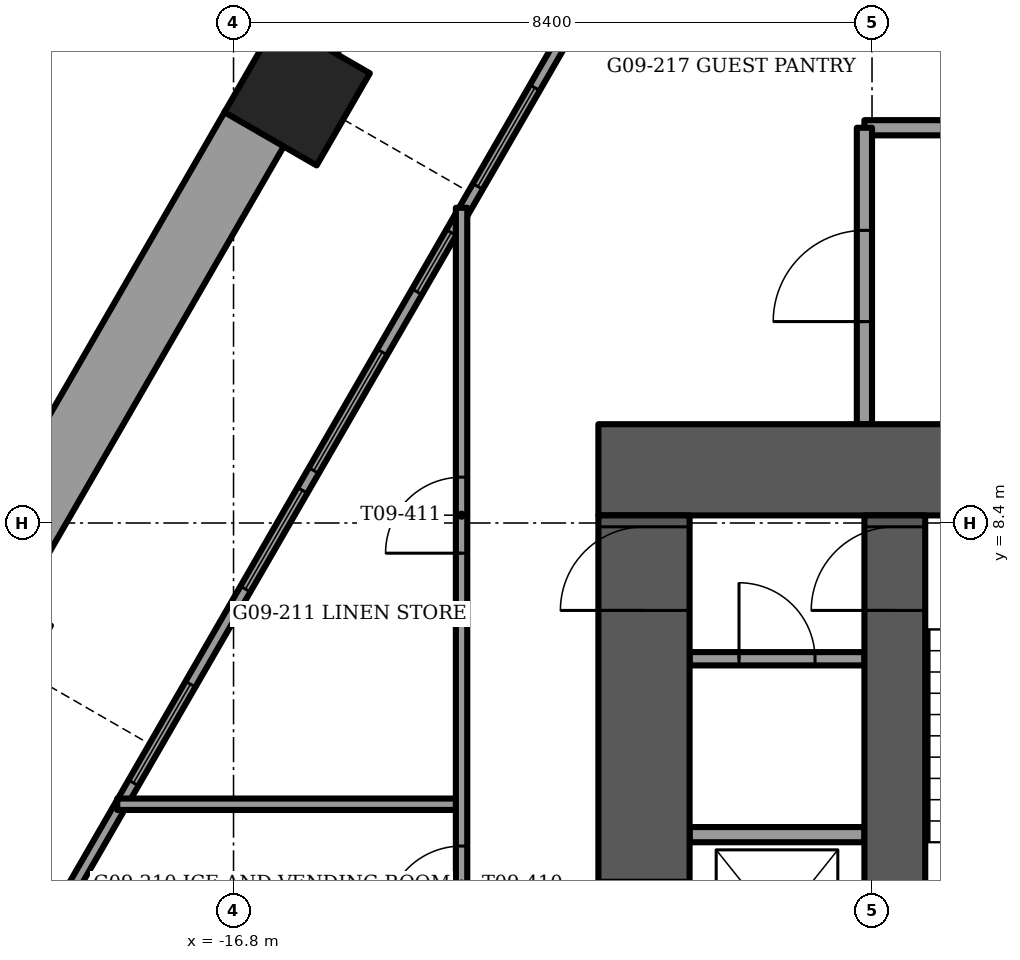
"""IFC4 building model, lengths in metres.
Left out: names, types, materials, properties, quantities, classifications, styles, units other than length and angle.
Written with IfcOpenShell. Run it as: python <this file> out.ifc"""

import sys

from ifc_helpers import new_model, si_unit, direction, frame, frame_2d, origin, origin_2d, place, context, subcontext, project, spatial, rectangle, extrude, element, fill, save


model = new_model("IFC4")
c1 = context("Model", 3, precision=1e-05, world=origin(), true_north=direction((0.0, 1.0)))
c2 = subcontext(c1, "Body", "Model", "MODEL_VIEW")
j1 = project(units=[si_unit("LENGTHUNIT", "METRE"), si_unit("PLANEANGLEUNIT", "RADIAN")], contexts=[c1])
p1 = place(None, origin())
s1 = spatial("IfcSite", under=j1, at=p1, CompositionType="ELEMENT")
p2 = place(p1, origin())
s2 = spatial("IfcBuilding", under=s1, at=p2, CompositionType="ELEMENT")
p3 = place(p2, frame((0.0, 0.0, 39.25)))
s3 = spatial("IfcBuildingStorey", under=s2, at=p3, CompositionType="ELEMENT", Elevation=39.25)
p4 = place(p3, frame((-15.963, 14.061, -1.2), z_axis=(0.0, 0.0, 1.0), x_axis=(0.5, 0.866025403784, 0.0)))
e1 = element("IfcColumn", 1, at=p4, inside=s3, PredefinedType="COLUMN", context=c2, shape_type="SweptSolid", body=[
    extrude(rectangle(XDim=1.4, YDim=1.4, at=origin_2d()), origin(), (0.0, 0.0, 1.0), 3.75),
])
p5 = place(p3, frame((-12.0, 9.1, -0.3), z_axis=(0.0, 0.0, 1.0), x_axis=(1.0, 0.0, 0.0)))
e2 = element("IfcWall", 2, at=p5, inside=s3, PredefinedType="SHEAR", context=c2, shape_type="SweptSolid", body=[
    extrude(rectangle(XDim=24.0, YDim=1.2, at=frame_2d((12.0, 0.0))), origin(), (0.0, 0.0, 1.0), 3.75),
])
p6 = place(p5, frame((11.2, 0.0, 0.0)))
e3 = element("IfcOpeningElement", 3, at=p6, cuts=e2, PredefinedType="OPENING", context=c2, shape_type="SweptSolid", body=[
    extrude(rectangle(XDim=1.6, YDim=2.1, at=frame_2d((0.8, 1.05))), frame((0.0, 0.6, 0.0), z_axis=(0.0, -1.0, 0.0), x_axis=(1.0, 0.0, 0.0)), (0.0, 0.0, 1.0), 1.2),
])
p7 = place(p5, frame((5.25, 0.0, 0.0)))
e4 = element("IfcOpeningElement", 4, at=p7, cuts=e2, PredefinedType="OPENING", context=c2, shape_type="SweptSolid", body=[
    extrude(rectangle(XDim=1.1, YDim=2.1, at=frame_2d((0.55, 1.05))), frame((0.0, 0.6, 0.0), z_axis=(0.0, -1.0, 0.0), x_axis=(1.0, 0.0, 0.0)), (0.0, 0.0, 1.0), 1.2),
])
p8 = place(p5, frame((17.65, 0.0, 0.0)))
e5 = element("IfcOpeningElement", 5, at=p8, cuts=e2, PredefinedType="OPENING", context=c2, shape_type="SweptSolid", body=[
    extrude(rectangle(XDim=1.1, YDim=2.1, at=frame_2d((0.55, 1.05))), frame((0.0, 0.6, 0.0), z_axis=(0.0, -1.0, 0.0), x_axis=(1.0, 0.0, 0.0)), (0.0, 0.0, 1.0), 1.2),
])
p9 = place(p3, frame((-8.1, -0.5, -0.3), z_axis=(0.0, 0.0, 1.0), x_axis=(0.0, 1.0, 0.0)))
e6 = element("IfcWall", 6, at=p9, inside=s3, PredefinedType="SHEAR", context=c2, shape_type="SweptSolid", body=[
    extrude(rectangle(XDim=9.0, YDim=0.8, at=frame_2d((4.5, 0.0))), origin(), (0.0, 0.0, 1.0), 3.75),
])
p10 = place(p9, frame((7.75, 0.0, 0.0)))
e7 = element("IfcOpeningElement", 7, at=p10, cuts=e6, PredefinedType="OPENING", context=c2, shape_type="SweptSolid", body=[
    extrude(rectangle(XDim=1.1, YDim=2.1, at=frame_2d((0.55, 1.05))), frame((0.0, 0.4, 0.0), z_axis=(0.0, -1.0, 0.0), x_axis=(1.0, 0.0, 0.0)), (0.0, 0.0, 1.0), 0.8),
])
p11 = place(p3, frame((-11.4, -0.5, -0.3), z_axis=(0.0, 0.0, 1.0), x_axis=(0.0, 1.0, 0.0)))
e8 = element("IfcWall", 8, at=p11, inside=s3, PredefinedType="SHEAR", context=c2, shape_type="SweptSolid", body=[
    extrude(rectangle(XDim=9.0, YDim=1.2, at=frame_2d((4.5, 0.0))), origin(), (0.0, 0.0, 1.0), 3.75),
])
p12 = place(p11, frame((7.75, 0.0, 0.0)))
e9 = element("IfcOpeningElement", 9, at=p12, cuts=e8, PredefinedType="OPENING", context=c2, shape_type="SweptSolid", body=[
    extrude(rectangle(XDim=1.1, YDim=2.1, at=frame_2d((0.55, 1.05))), frame((0.0, 0.6, 0.0), z_axis=(0.0, -1.0, 0.0), x_axis=(1.0, 0.0, 0.0)), (0.0, 0.0, 1.0), 1.2),
])
p13 = place(p11, frame((0.55, 0.0, 0.0)))
e10 = element("IfcOpeningElement", 10, at=p13, cuts=e8, PredefinedType="OPENING", context=c2, shape_type="SweptSolid", body=[
    extrude(rectangle(XDim=1.2, YDim=2.1, at=frame_2d((0.6, 1.05))), frame((0.0, 0.6, 0.0), z_axis=(0.0, -1.0, 0.0), x_axis=(1.0, 0.0, 0.0)), (0.0, 0.0, 1.0), 1.2),
])
p14 = place(p11, frame((3.0, 0.0, 0.0)))
e11 = element("IfcOpeningElement", 11, at=p14, cuts=e8, PredefinedType="OPENING", context=c2, shape_type="SweptSolid", body=[
    extrude(rectangle(XDim=1.2, YDim=2.1, at=frame_2d((0.6, 1.05))), frame((0.0, 0.6, 0.0), z_axis=(0.0, -1.0, 0.0), x_axis=(1.0, 0.0, 0.0)), (0.0, 0.0, 1.0), 1.2),
])
p15 = place(p3, frame((-12.422, 20.694, 0.0), z_axis=(0.0, 0.0, 1.0), x_axis=(-0.499994135611, -0.866028789565, 0.0)))
e12 = element("IfcWall", 12, at=p15, inside=s3, PredefinedType="PARAPET", context=c2, shape_type="SweptSolid", body=[
    extrude(rectangle(XDim=6.845, YDim=0.9, at=frame_2d((3.423, 0.0))), origin(), (0.0, 0.0, 1.0), 1.1),
])
p16 = place(p3, frame((-16.514, 13.605, 0.0), z_axis=(0.0, 0.0, 1.0), x_axis=(-0.499997206141, -0.866027016814, 0.0)))
e13 = element("IfcWall", 13, at=p16, inside=s3, PredefinedType="PARAPET", context=c2, shape_type="SweptSolid", body=[
    extrude(rectangle(XDim=7.051, YDim=0.9, at=frame_2d((3.525, 0.0))), origin(), (0.0, 0.0, 1.0), 1.1),
])
p17 = place(p3, frame((-9.276, 20.292, 0.0), z_axis=(0.0, 0.0, 1.0), x_axis=(-0.500006057782, -0.866021906294, 0.0)))
e14 = element("IfcWall", 14, at=p17, inside=s3, PredefinedType="SOLIDWALL", context=c2, shape_type="SweptSolid", body=[
    extrude(rectangle(XDim=23.1, YDim=0.15, at=frame_2d((11.55, 0.0))), origin(), (0.0, 0.0, 1.0), 3.45),
])
p18 = place(p17, frame((2.736, 0.0, 0.15)))
e15 = element("IfcOpeningElement", 15, at=p18, cuts=e14, PredefinedType="OPENING", context=c2, shape_type="SweptSolid", body=[
    extrude(rectangle(XDim=0.9, YDim=2.85, at=frame_2d((0.45, 1.425))), frame((0.0, 0.075, 0.0), z_axis=(0.0, -1.0, 0.0), x_axis=(1.0, 0.0, 0.0)), (0.0, 0.0, 1.0), 0.15),
])
p19 = place(p17, frame((3.825, 0.0, 0.15)))
e16 = element("IfcOpeningElement", 16, at=p19, cuts=e14, PredefinedType="OPENING", context=c2, shape_type="SweptSolid", body=[
    extrude(rectangle(XDim=1.5, YDim=2.85, at=frame_2d((0.75, 1.425))), frame((0.0, 0.075, 0.0), z_axis=(0.0, -1.0, 0.0), x_axis=(1.0, 0.0, 0.0)), (0.0, 0.0, 1.0), 0.15),
])
p20 = place(p17, frame((9.32, 0.0, 0.15)))
e17 = element("IfcOpeningElement", 17, at=p20, cuts=e14, PredefinedType="OPENING", context=c2, shape_type="SweptSolid", body=[
    extrude(rectangle(XDim=0.9, YDim=2.85, at=frame_2d((0.45, 1.425))), frame((0.0, 0.075, 0.0), z_axis=(0.0, -1.0, 0.0), x_axis=(1.0, 0.0, 0.0)), (0.0, 0.0, 1.0), 0.15),
])
p21 = place(p17, frame((7.12, 0.0, 0.15)))
e18 = element("IfcOpeningElement", 18, at=p21, cuts=e14, PredefinedType="OPENING", context=c2, shape_type="SweptSolid", body=[
    extrude(rectangle(XDim=1.5, YDim=2.85, at=frame_2d((0.75, 1.425))), frame((0.0, 0.075, 0.0), z_axis=(0.0, -1.0, 0.0), x_axis=(1.0, 0.0, 0.0)), (0.0, 0.0, 1.0), 0.15),
])
p22 = place(p17, frame((11.136, 0.0, 0.15)))
e19 = element("IfcOpeningElement", 19, at=p22, cuts=e14, PredefinedType="OPENING", context=c2, shape_type="SweptSolid", body=[
    extrude(rectangle(XDim=1.8, YDim=2.85, at=frame_2d((0.9, 1.425))), frame((0.0, 0.075, 0.0), z_axis=(0.0, -1.0, 0.0), x_axis=(1.0, 0.0, 0.0)), (0.0, 0.0, 1.0), 0.15),
])
p23 = place(p17, frame((13.236, 0.0, 0.15)))
e20 = element("IfcOpeningElement", 20, at=p23, cuts=e14, PredefinedType="OPENING", context=c2, shape_type="SweptSolid", body=[
    extrude(rectangle(XDim=1.5, YDim=2.85, at=frame_2d((0.75, 1.425))), frame((0.0, 0.075, 0.0), z_axis=(0.0, -1.0, 0.0), x_axis=(1.0, 0.0, 0.0)), (0.0, 0.0, 1.0), 0.15),
])
p24 = place(p17, frame((16.18, 0.0, 0.15)))
e21 = element("IfcOpeningElement", 21, at=p24, cuts=e14, PredefinedType="OPENING", context=c2, shape_type="SweptSolid", body=[
    extrude(rectangle(XDim=1.5, YDim=2.85, at=frame_2d((0.75, 1.425))), frame((0.0, 0.075, 0.0), z_axis=(0.0, -1.0, 0.0), x_axis=(1.0, 0.0, 0.0)), (0.0, 0.0, 1.0), 0.15),
])
p25 = place(p17, frame((0.44, 0.0, 0.15)))
e22 = element("IfcOpeningElement", 22, at=p25, cuts=e14, PredefinedType="OPENING", context=c2, shape_type="SweptSolid", body=[
    extrude(rectangle(XDim=0.9, YDim=2.73, at=frame_2d((0.45, 1.365))), frame((0.0, 0.075, 0.0), z_axis=(0.0, -1.0, 0.0), x_axis=(1.0, 0.0, 0.0)), (0.0, 0.0, 1.0), 0.15),
])
p26 = place(p17, frame((20.978, 0.0, 0.15)))
e23 = element("IfcOpeningElement", 23, at=p26, cuts=e14, PredefinedType="OPENING", context=c2, shape_type="SweptSolid", body=[
    extrude(rectangle(XDim=1.8, YDim=2.73, at=frame_2d((0.9, 1.365))), frame((0.0, 0.075, 0.0), z_axis=(0.0, -1.0, 0.0), x_axis=(1.0, 0.0, 0.0)), (0.0, 0.0, 1.0), 0.15),
])
p27 = place(p3, frame((-8.5, 13.6, 0.0), z_axis=(0.0, 0.0, 1.0), x_axis=(1.0, 0.0, 0.0)))
e24 = element("IfcWall", 24, at=p27, inside=s3, PredefinedType="PARTITIONING", context=c2, shape_type="SweptSolid", body=[
    extrude(rectangle(XDim=17.0, YDim=0.2, at=frame_2d((8.5, 0.0))), origin(), (0.0, 0.0, 1.0), 3.45),
])
p28 = place(p27, frame((8.0, 0.0, 0.0)))
e25 = element("IfcOpeningElement", 25, at=p28, cuts=e24, PredefinedType="OPENING", context=c2, shape_type="SweptSolid", body=[
    extrude(rectangle(XDim=1.0, YDim=2.1, at=frame_2d((0.5, 1.05))), frame((0.0, 0.1, 0.0), z_axis=(0.0, -1.0, 0.0), x_axis=(1.0, 0.0, 0.0)), (0.0, 0.0, 1.0), 0.2),
])
p29 = place(p3, frame((-8.5, 9.7, 0.0), z_axis=(0.0, 0.0, 1.0), x_axis=(0.0, 1.0, 0.0)))
e26 = element("IfcWall", 26, at=p29, inside=s3, PredefinedType="PARTITIONING", context=c2, shape_type="SweptSolid", body=[
    extrude(rectangle(XDim=3.9, YDim=0.2, at=frame_2d((1.95, 0.0))), origin(), (0.0, 0.0, 1.0), 3.45),
])
p30 = place(p29, frame((1.35, 0.0, 0.0)))
e27 = element("IfcOpeningElement", 27, at=p30, cuts=e26, PredefinedType="OPENING", context=c2, shape_type="SweptSolid", body=[
    extrude(rectangle(XDim=1.2, YDim=2.1, at=frame_2d((0.6, 1.05))), frame((0.0, 0.1, 0.0), z_axis=(0.0, -1.0, 0.0), x_axis=(1.0, 0.0, 0.0)), (0.0, 0.0, 1.0), 0.2),
])
p31 = place(p3, frame((-10.8, 4.3, 0.0), z_axis=(0.0, 0.0, 1.0), x_axis=(1.0, 0.0, 0.0)))
e28 = element("IfcWall", 28, at=p31, inside=s3, PredefinedType="PARTITIONING", context=c2, shape_type="SweptSolid", body=[
    extrude(rectangle(XDim=2.3, YDim=0.2, at=frame_2d((1.15, 0.0))), origin(), (0.0, 0.0, 1.0), 3.45),
])
p32 = place(p3, frame((-10.8, 6.614, 0.0), z_axis=(0.0, 0.0, 1.0), x_axis=(1.0, 0.0, 0.0)))
e29 = element("IfcWall", 29, at=p32, inside=s3, PredefinedType="PARTITIONING", context=c2, shape_type="SweptSolid", body=[
    extrude(rectangle(XDim=2.3, YDim=0.175, at=frame_2d((1.15, 0.0))), origin(), (0.0, 0.0, 1.0), 3.45),
])
p33 = place(p32, frame((0.65, 0.0, 0.0)))
e30 = element("IfcOpeningElement", 30, at=p33, cuts=e29, PredefinedType="OPENING", context=c2, shape_type="SweptSolid", body=[
    extrude(rectangle(XDim=1.0, YDim=2.1, at=frame_2d((0.5, 1.05))), frame((0.0, 0.087, 0.0), z_axis=(0.0, -1.0, 0.0), x_axis=(1.0, 0.0, 0.0)), (0.0, 0.0, 1.0), 0.175),
])
p34 = place(p3, frame((-18.33, 4.7, 0.0), z_axis=(0.0, 0.0, 1.0), x_axis=(1.0, 0.0, 0.0)))
e31 = element("IfcWall", 31, at=p34, inside=s3, PredefinedType="PARTITIONING", context=c2, shape_type="SweptSolid", body=[
    extrude(rectangle(XDim=4.53, YDim=0.15, at=frame_2d((2.265, 0.0))), origin(), (0.0, 0.0, 1.0), 3.45),
])
p35 = place(p3, frame((-13.8, -3.7, 0.0), z_axis=(0.0, 0.0, 1.0), x_axis=(0.0, 1.0, 0.0)))
e32 = element("IfcWall", 32, at=p35, inside=s3, PredefinedType="PARTITIONING", context=c2, shape_type="SweptSolid", body=[
    extrude(rectangle(XDim=16.247, YDim=0.15, at=frame_2d((8.124, 0.0))), origin(), (0.0, 0.0, 1.0), 3.45),
])
p36 = place(p35, frame((0.55, 0.0, 0.0)))
e33 = element("IfcOpeningElement", 33, at=p36, cuts=e32, PredefinedType="OPENING", context=c2, shape_type="SweptSolid", body=[
    extrude(rectangle(XDim=1.0, YDim=2.1, at=frame_2d((0.5, 1.05))), frame((0.0, 0.075, 0.0), z_axis=(0.0, -1.0, 0.0), x_axis=(1.0, 0.0, 0.0)), (0.0, 0.0, 1.0), 0.15),
])
p37 = place(p35, frame((2.35, 0.0, 0.0)))
e34 = element("IfcOpeningElement", 34, at=p37, cuts=e32, PredefinedType="OPENING", context=c2, shape_type="SweptSolid", body=[
    extrude(rectangle(XDim=1.0, YDim=2.1, at=frame_2d((0.5, 1.05))), frame((0.0, 0.075, 0.0), z_axis=(0.0, -1.0, 0.0), x_axis=(1.0, 0.0, 0.0)), (0.0, 0.0, 1.0), 0.15),
])
p38 = place(p35, frame((6.85, 0.0, 0.0)))
e35 = element("IfcOpeningElement", 35, at=p38, cuts=e32, PredefinedType="OPENING", context=c2, shape_type="SweptSolid", body=[
    extrude(rectangle(XDim=1.0, YDim=2.1, at=frame_2d((0.5, 1.05))), frame((0.0, 0.075, 0.0), z_axis=(0.0, -1.0, 0.0), x_axis=(1.0, 0.0, 0.0)), (0.0, 0.0, 1.0), 0.15),
])
p39 = place(p35, frame((11.703, 0.0, 0.0)))
e36 = element("IfcOpeningElement", 36, at=p39, cuts=e32, PredefinedType="OPENING", context=c2, shape_type="SweptSolid", body=[
    extrude(rectangle(XDim=1.0, YDim=2.1, at=frame_2d((0.5, 1.05))), frame((0.0, 0.075, 0.0), z_axis=(0.0, -1.0, 0.0), x_axis=(1.0, 0.0, 0.0)), (0.0, 0.0, 1.0), 0.15),
])
p40 = place(p20, origin())
e37 = element("IfcWindow", 37, at=p40, inside=s3, PartitioningType="SINGLE_PANEL", PredefinedType="WINDOW", context=c2, shape_type="SweptSolid", body=[
    extrude(rectangle(XDim=0.9, YDim=2.85, at=frame_2d((0.45, 1.425))), frame((0.0, 0.03, 0.0), z_axis=(0.0, -1.0, 0.0), x_axis=(1.0, 0.0, 0.0)), (0.0, 0.0, 1.0), 0.06),
])
fill(e17, e37)
p41 = place(p21, origin())
e38 = element("IfcWindow", 38, at=p41, inside=s3, PartitioningType="SINGLE_PANEL", PredefinedType="WINDOW", context=c2, shape_type="SweptSolid", body=[
    extrude(rectangle(XDim=1.5, YDim=2.85, at=frame_2d((0.75, 1.425))), frame((0.0, 0.03, 0.0), z_axis=(0.0, -1.0, 0.0), x_axis=(1.0, 0.0, 0.0)), (0.0, 0.0, 1.0), 0.06),
])
fill(e18, e38)
p42 = place(p22, origin())
e39 = element("IfcWindow", 39, at=p42, inside=s3, PartitioningType="SINGLE_PANEL", PredefinedType="WINDOW", context=c2, shape_type="SweptSolid", body=[
    extrude(rectangle(XDim=1.8, YDim=2.85, at=frame_2d((0.9, 1.425))), frame((0.0, 0.03, 0.0), z_axis=(0.0, -1.0, 0.0), x_axis=(1.0, 0.0, 0.0)), (0.0, 0.0, 1.0), 0.06),
])
fill(e19, e39)
p43 = place(p23, origin())
e40 = element("IfcWindow", 40, at=p43, inside=s3, PartitioningType="SINGLE_PANEL", PredefinedType="WINDOW", context=c2, shape_type="SweptSolid", body=[
    extrude(rectangle(XDim=1.5, YDim=2.85, at=frame_2d((0.75, 1.425))), frame((0.0, 0.03, 0.0), z_axis=(0.0, -1.0, 0.0), x_axis=(1.0, 0.0, 0.0)), (0.0, 0.0, 1.0), 0.06),
])
fill(e20, e40)
p44 = place(p24, origin())
e41 = element("IfcWindow", 41, at=p44, inside=s3, PartitioningType="SINGLE_PANEL", PredefinedType="WINDOW", context=c2, shape_type="SweptSolid", body=[
    extrude(rectangle(XDim=1.5, YDim=2.85, at=frame_2d((0.75, 1.425))), frame((0.0, 0.03, 0.0), z_axis=(0.0, -1.0, 0.0), x_axis=(1.0, 0.0, 0.0)), (0.0, 0.0, 1.0), 0.06),
])
fill(e21, e41)
p45 = place(p10, origin())
e42 = element("IfcDoor", 42, at=p45, inside=s3, OperationType="SINGLE_SWING_RIGHT", PredefinedType="DOOR", context=c2, shape_type="SweptSolid", body=[
    extrude(rectangle(XDim=1.1, YDim=2.1, at=frame_2d((0.55, 1.05))), frame((0.0, 0.025, 0.0), z_axis=(0.0, -1.0, 0.0), x_axis=(1.0, 0.0, 0.0)), (0.0, 0.0, 1.0), 0.05),
])
fill(e7, e42)
p46 = place(p30, origin())
e43 = element("IfcDoor", 43, at=p46, inside=s3, OperationType="SINGLE_SWING_LEFT", PredefinedType="DOOR", context=c2, shape_type="SweptSolid", body=[
    extrude(rectangle(XDim=1.2, YDim=2.1, at=frame_2d((0.6, 1.05))), frame((0.0, 0.025, 0.0), z_axis=(0.0, -1.0, 0.0), x_axis=(1.0, 0.0, 0.0)), (0.0, 0.0, 1.0), 0.05),
])
fill(e27, e43)
p47 = place(p33, origin())
e44 = element("IfcDoor", 44, at=p47, inside=s3, OperationType="SINGLE_SWING_LEFT", PredefinedType="DOOR", context=c2, shape_type="SweptSolid", body=[
    extrude(rectangle(XDim=1.0, YDim=2.1, at=frame_2d((0.5, 1.05))), frame((0.0, 0.025, 0.0), z_axis=(0.0, -1.0, 0.0), x_axis=(1.0, 0.0, 0.0)), (0.0, 0.0, 1.0), 0.05),
])
fill(e30, e44)
p48 = place(p12, origin())
e45 = element("IfcDoor", 45, at=p48, inside=s3, OperationType="SINGLE_SWING_LEFT", PredefinedType="DOOR", context=c2, shape_type="SweptSolid", body=[
    extrude(rectangle(XDim=1.1, YDim=2.1, at=frame_2d((0.55, 1.05))), frame((0.0, 0.025, 0.0), z_axis=(0.0, -1.0, 0.0), x_axis=(1.0, 0.0, 0.0)), (0.0, 0.0, 1.0), 0.05),
])
fill(e9, e45)
p49 = place(p14, origin())
e46 = element("IfcDoor", 46, at=p49, inside=s3, OperationType="SLIDING_TO_LEFT", PredefinedType="DOOR", context=c2, shape_type="SweptSolid", body=[
    extrude(rectangle(XDim=1.2, YDim=2.1, at=frame_2d((0.6, 1.05))), frame((0.0, 0.025, 0.0), z_axis=(0.0, -1.0, 0.0), x_axis=(1.0, 0.0, 0.0)), (0.0, 0.0, 1.0), 0.05),
])
fill(e11, e46)
p50 = place(p38, origin())
e47 = element("IfcDoor", 47, at=p50, inside=s3, OperationType="SINGLE_SWING_LEFT", PredefinedType="DOOR", context=c2, shape_type="SweptSolid", body=[
    extrude(rectangle(XDim=1.0, YDim=2.1, at=frame_2d((0.5, 1.05))), frame((0.0, 0.025, 0.0), z_axis=(0.0, -1.0, 0.0), x_axis=(1.0, 0.0, 0.0)), (0.0, 0.0, 1.0), 0.05),
])
fill(e35, e47)
p51 = place(p39, origin())
e48 = element("IfcDoor", 48, at=p51, inside=s3, OperationType="SINGLE_SWING_LEFT", PredefinedType="DOOR", context=c2, shape_type="SweptSolid", body=[
    extrude(rectangle(XDim=1.0, YDim=2.1, at=frame_2d((0.5, 1.05))), frame((0.0, 0.025, 0.0), z_axis=(0.0, -1.0, 0.0), x_axis=(1.0, 0.0, 0.0)), (0.0, 0.0, 1.0), 0.05),
])
fill(e36, e48)
save(model, sys.argv[1])
